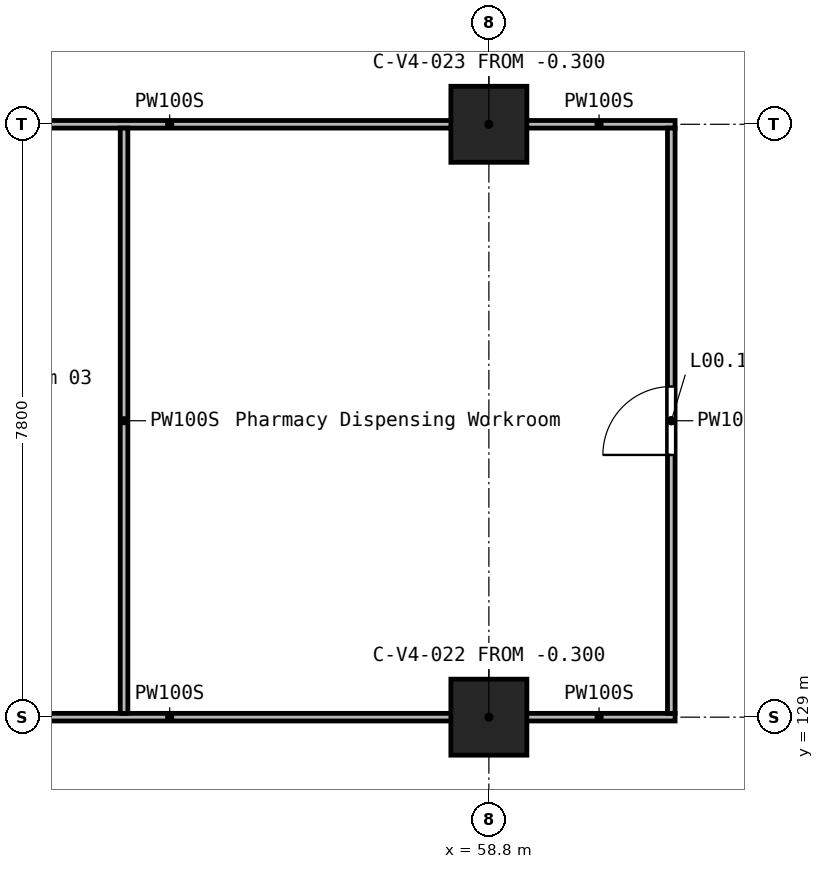
"""IFC4 building model, lengths in metres.
Left out: names, types, materials, properties, quantities, classifications, styles, units other than length and angle.
Written with IfcOpenShell. Run it as: python <this file> out.ifc"""

import sys

from ifc_helpers import new_model, si_unit, direction, frame, frame_2d, origin, origin_2d, place, context, subcontext, project, spatial, rectangle, extrude, element, fill, save


model = new_model("IFC4")
c1 = context("Model", 3, precision=1e-05, world=origin(), true_north=direction((0.0, 1.0)))
c2 = subcontext(c1, "Body", "Model", "MODEL_VIEW")
j1 = project(units=[si_unit("LENGTHUNIT", "METRE"), si_unit("PLANEANGLEUNIT", "RADIAN")], contexts=[c1])
p1 = place(None, origin())
s1 = spatial("IfcSite", under=j1, at=p1, CompositionType="ELEMENT")
p2 = place(p1, origin())
s2 = spatial("IfcBuilding", under=s1, at=p2, CompositionType="ELEMENT")
p3 = place(p2, origin())
s3 = spatial("IfcBuildingStorey", under=s2, at=p3, CompositionType="ELEMENT", Elevation=0.0)
for number, where, z_axis, x_axis in (
    (1, (58.8, 129.0, -0.3), (0.0, 0.0, 1.0), (1.0, 0.0, 0.0)),
    (2, (58.8, 136.8, -0.3), (0.0, 0.0, 1.0), (1.0, 0.0, 0.0)),
):
    element("IfcColumn", number, at=place(p3, frame(where, z_axis=z_axis, x_axis=x_axis)), inside=s3, PredefinedType="COLUMN", context=c2, shape_type="SweptSolid", body=[
        extrude(rectangle(XDim=1.0, YDim=1.0, at=origin_2d()), origin(), (0.0, 0.0, 1.0), 5.7),
    ])
p4 = place(p3, frame((61.25, 129.0, 0.0), z_axis=(0.0, 0.0, 1.0), x_axis=(-1.0, 0.0, 0.0)))
e3 = element("IfcWall", 3, at=p4, inside=s3, PredefinedType="PARTITIONING", context=c2, shape_type="SweptSolid", body=[
    extrude(rectangle(XDim=2.0, YDim=0.1, at=frame_2d((1.0, 0.0))), origin(), (0.0, 0.0, 1.0), 5.05),
])
p5 = place(p3, frame((58.35, 129.0, 0.0), z_axis=(0.0, 0.0, 1.0), x_axis=(-1.0, 0.0, 0.0)))
e4 = element("IfcWall", 4, at=p5, inside=s3, PredefinedType="PARTITIONING", context=c2, shape_type="SweptSolid", body=[
    extrude(rectangle(XDim=7.5, YDim=0.1, at=frame_2d((3.75, 0.0))), origin(), (0.0, 0.0, 1.0), 5.05),
])
p6 = place(p5, frame((5.7, 0.0, 0.0)))
e5 = element("IfcOpeningElement", 5, at=p6, cuts=e4, PredefinedType="OPENING", context=c2, shape_type="SweptSolid", body=[
    extrude(rectangle(XDim=0.9, YDim=2.1, at=frame_2d((0.45, 1.05))), frame((0.0, 0.06, 0.0), z_axis=(0.0, -1.0, 0.0), x_axis=(1.0, 0.0, 0.0)), (0.0, 0.0, 1.0), 0.12),
])
p7 = place(p3, frame((61.25, 136.8, 0.0), z_axis=(0.0, 0.0, 1.0), x_axis=(-1.0, 0.0, 0.0)))
e6 = element("IfcWall", 6, at=p7, inside=s3, PredefinedType="PARTITIONING", context=c2, shape_type="SweptSolid", body=[
    extrude(rectangle(XDim=2.0, YDim=0.1, at=frame_2d((1.0, 0.0))), origin(), (0.0, 0.0, 1.0), 5.05),
])
p8 = place(p3, frame((58.35, 136.8, 0.0), z_axis=(0.0, 0.0, 1.0), x_axis=(-1.0, 0.0, 0.0)))
e7 = element("IfcWall", 7, at=p8, inside=s3, PredefinedType="PARTITIONING", context=c2, shape_type="SweptSolid", body=[
    extrude(rectangle(XDim=7.5, YDim=0.1, at=frame_2d((3.75, 0.0))), origin(), (0.0, 0.0, 1.0), 5.05),
])
p9 = place(p3, frame((54.0, 129.05, 0.0), z_axis=(0.0, 0.0, 1.0), x_axis=(0.0, 1.0, 0.0)))
e8 = element("IfcWall", 8, at=p9, inside=s3, PredefinedType="PARTITIONING", context=c2, shape_type="SweptSolid", body=[
    extrude(rectangle(XDim=7.7, YDim=0.1, at=frame_2d((3.85, 0.0))), origin(), (0.0, 0.0, 1.0), 5.05),
])
p10 = place(p3, frame((61.2, 129.05, 0.0), z_axis=(0.0, 0.0, 1.0), x_axis=(0.0, 1.0, 0.0)))
e9 = element("IfcWall", 9, at=p10, inside=s3, PredefinedType="PARTITIONING", context=c2, shape_type="SweptSolid", body=[
    extrude(rectangle(XDim=7.7, YDim=0.1, at=frame_2d((3.85, 0.0))), origin(), (0.0, 0.0, 1.0), 5.05),
])
p11 = place(p10, frame((3.4, 0.0, 0.0)))
e10 = element("IfcOpeningElement", 10, at=p11, cuts=e9, PredefinedType="OPENING", context=c2, shape_type="SweptSolid", body=[
    extrude(rectangle(XDim=0.9, YDim=2.1, at=frame_2d((0.45, 1.05))), frame((0.0, 0.06, 0.0), z_axis=(0.0, -1.0, 0.0), x_axis=(1.0, 0.0, 0.0)), (0.0, 0.0, 1.0), 0.12),
])
p12 = place(p11, origin())
e11 = element("IfcDoor", 11, at=p12, inside=s3, OperationType="SINGLE_SWING_LEFT", PredefinedType="DOOR", context=c2, shape_type="SweptSolid", body=[
    extrude(rectangle(XDim=0.9, YDim=2.1, at=frame_2d((0.45, 1.05))), frame((0.0, 0.025, 0.0), z_axis=(0.0, -1.0, 0.0), x_axis=(1.0, 0.0, 0.0)), (0.0, 0.0, 1.0), 0.05),
])
fill(e10, e11)
save(model, sys.argv[1])
